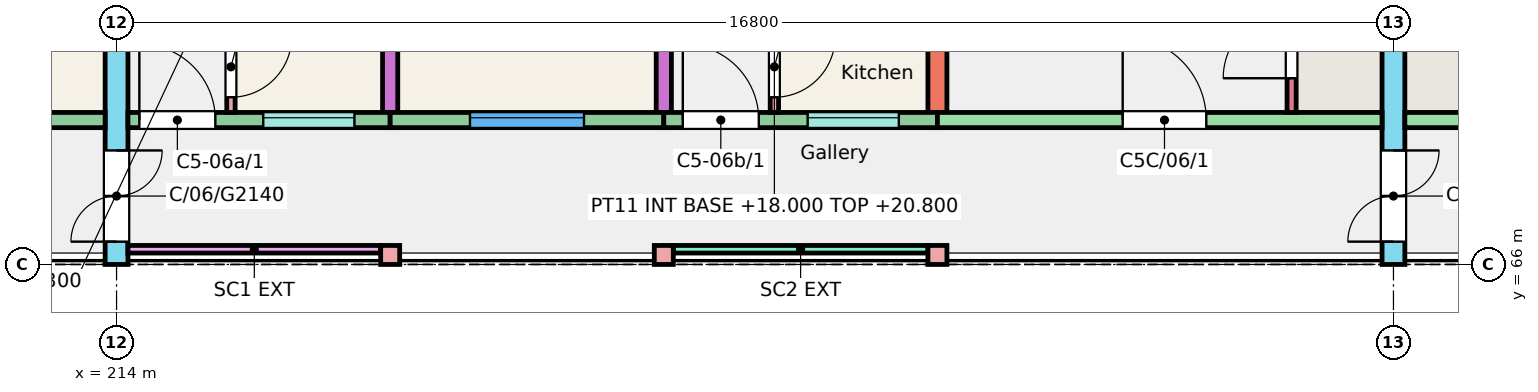
"""IFC4 building model, lengths in metres.
Left out: names, types, materials, properties, quantities, classifications, styles, units other than length and angle.
Written with IfcOpenShell. Run it as: python <this file> out.ifc"""

import sys

from ifc_helpers import new_model, si_unit, direction, frame, frame_2d, origin, origin_2d, place, context, subcontext, project, spatial, rectangle, extrude, element, fill, save


model = new_model("IFC4")
c1 = context("Model", 3, precision=1e-05, world=origin(), true_north=direction((0.0, 1.0)))
c2 = subcontext(c1, "Body", "Model", "MODEL_VIEW")
j1 = project(units=[si_unit("LENGTHUNIT", "METRE"), si_unit("PLANEANGLEUNIT", "RADIAN")], contexts=[c1])
p1 = place(None, origin())
s1 = spatial("IfcSite", under=j1, at=p1, CompositionType="ELEMENT")
p2 = place(p1, origin())
s2 = spatial("IfcBuilding", under=s1, at=p2, CompositionType="ELEMENT")
p3 = place(p2, frame((0.0, 0.0, 18.0)))
s3 = spatial("IfcBuildingStorey", under=s2, at=p3, CompositionType="ELEMENT", Elevation=18.0)
p4 = place(p3, frame((214.0, 66.0, 0.0), z_axis=(0.0, 0.0, 1.0), x_axis=(0.0, 1.0, 0.0)))
e1 = element("IfcWall", 1, at=p4, inside=s3, PredefinedType="SHEAR", context=c2, shape_type="SweptSolid", body=[
    extrude(rectangle(XDim=11.0, YDim=0.3, at=frame_2d((5.5, 0.0))), origin(), (0.0, 0.0, 1.0), 3.0),
])
p5 = place(p4, frame((0.3, 0.0, 0.0)))
e2 = element("IfcOpeningElement", 2, at=p5, cuts=e1, PredefinedType="OPENING", context=c2, shape_type="SweptSolid", body=[
    extrude(rectangle(XDim=1.2, YDim=2.1, at=frame_2d((0.6, 1.05))), frame((0.0, 0.16, 0.0), z_axis=(0.0, -1.0, 0.0), x_axis=(1.0, 0.0, 0.0)), (0.0, 0.0, 1.0), 0.32),
])
p6 = place(p3, frame((217.6, 68.0, 0.0), z_axis=(0.0, 0.0, 1.0), x_axis=(0.0, 1.0, 0.0)))
e3 = element("IfcWall", 3, at=p6, inside=s3, PredefinedType="SHEAR", context=c2, shape_type="SweptSolid", body=[
    extrude(rectangle(XDim=9.0, YDim=0.2, at=frame_2d((4.5, 0.0))), origin(), (0.0, 0.0, 1.0), 3.0),
])
p7 = place(p3, frame((221.2, 68.0, 0.0), z_axis=(0.0, 0.0, 1.0), x_axis=(0.0, 1.0, 0.0)))
e4 = element("IfcWall", 4, at=p7, inside=s3, PredefinedType="SHEAR", context=c2, shape_type="SweptSolid", body=[
    extrude(rectangle(XDim=9.0, YDim=0.2, at=frame_2d((4.5, 0.0))), origin(), (0.0, 0.0, 1.0), 3.0),
])
p8 = place(p7, frame((2.4, 0.0, 0.0)))
e5 = element("IfcOpeningElement", 5, at=p8, cuts=e4, PredefinedType="OPENING", context=c2, shape_type="SweptSolid", body=[
    extrude(rectangle(XDim=1.2, YDim=2.1, at=frame_2d((0.6, 1.05))), frame((0.0, 0.11, 0.0), z_axis=(0.0, -1.0, 0.0), x_axis=(1.0, 0.0, 0.0)), (0.0, 0.0, 1.0), 0.22),
])
p9 = place(p7, frame((6.4, 0.0, 0.0)))
e6 = element("IfcOpeningElement", 6, at=p9, cuts=e4, PredefinedType="OPENING", context=c2, shape_type="SweptSolid", body=[
    extrude(rectangle(XDim=1.2, YDim=2.1, at=frame_2d((0.6, 1.05))), frame((0.0, 0.11, 0.0), z_axis=(0.0, -1.0, 0.0), x_axis=(1.0, 0.0, 0.0)), (0.0, 0.0, 1.0), 0.22),
])
p10 = place(p3, frame((224.8, 68.0, 0.0), z_axis=(0.0, 0.0, 1.0), x_axis=(0.0, 1.0, 0.0)))
e7 = element("IfcWall", 7, at=p10, inside=s3, PredefinedType="SHEAR", context=c2, shape_type="SweptSolid", body=[
    extrude(rectangle(XDim=9.0, YDim=0.25, at=frame_2d((4.5, 0.0))), origin(), (0.0, 0.0, 1.0), 3.0),
])
p11 = place(p3, frame((230.8, 66.0, 0.0), z_axis=(0.0, 0.0, 1.0), x_axis=(0.0, 1.0, 0.0)))
e8 = element("IfcWall", 8, at=p11, inside=s3, PredefinedType="SHEAR", context=c2, shape_type="SweptSolid", body=[
    extrude(rectangle(XDim=11.0, YDim=0.3, at=frame_2d((5.5, 0.0))), origin(), (0.0, 0.0, 1.0), 3.0),
])
p12 = place(p11, frame((0.3, 0.0, 0.0)))
e9 = element("IfcOpeningElement", 9, at=p12, cuts=e8, PredefinedType="OPENING", context=c2, shape_type="SweptSolid", body=[
    extrude(rectangle(XDim=1.2, YDim=2.1, at=frame_2d((0.6, 1.05))), frame((0.0, 0.16, 0.0), z_axis=(0.0, -1.0, 0.0), x_axis=(1.0, 0.0, 0.0)), (0.0, 0.0, 1.0), 0.32),
])
p13 = place(p3, frame((210.4, 67.9, 0.0), z_axis=(0.0, 0.0, 1.0), x_axis=(1.0, 0.0, 0.0)))
e10 = element("IfcWall", 10, at=p13, inside=s3, PredefinedType="SOLIDWALL", context=c2, shape_type="SweptSolid", body=[
    extrude(rectangle(XDim=3.45, YDim=0.2, at=frame_2d((1.725, 0.0))), origin(), (0.0, 0.0, 1.0), 3.0),
])
p14 = place(p13, frame((1.025, 0.0, 0.9)))
e11 = element("IfcOpeningElement", 11, at=p14, cuts=e10, PredefinedType="OPENING", context=c2, shape_type="SweptSolid", body=[
    extrude(rectangle(XDim=1.5, YDim=1.5, at=frame_2d((0.75, 0.75))), frame((0.0, 0.11, 0.0), z_axis=(0.0, -1.0, 0.0), x_axis=(1.0, 0.0, 0.0)), (0.0, 0.0, 1.0), 0.22),
])
p15 = place(p3, frame((214.15, 67.9, 0.0), z_axis=(0.0, 0.0, 1.0), x_axis=(1.0, 0.0, 0.0)))
e12 = element("IfcWall", 12, at=p15, inside=s3, PredefinedType="SOLIDWALL", context=c2, shape_type="SweptSolid", body=[
    extrude(rectangle(XDim=3.45, YDim=0.2, at=frame_2d((1.725, 0.0))), origin(), (0.0, 0.0, 1.0), 3.0),
])
p16 = place(p15, frame((1.78, 0.0, 1.1)))
e13 = element("IfcOpeningElement", 13, at=p16, cuts=e12, PredefinedType="OPENING", context=c2, shape_type="SweptSolid", body=[
    extrude(rectangle(XDim=1.2, YDim=1.3, at=frame_2d((0.6, 0.65))), frame((0.0, 0.11, 0.0), z_axis=(0.0, -1.0, 0.0), x_axis=(1.0, 0.0, 0.0)), (0.0, 0.0, 1.0), 0.22),
])
p17 = place(p15, frame((0.15, 0.0, 0.0)))
e14 = element("IfcOpeningElement", 14, at=p17, cuts=e12, PredefinedType="OPENING", context=c2, shape_type="SweptSolid", body=[
    extrude(rectangle(XDim=1.0, YDim=2.1, at=frame_2d((0.5, 1.05))), frame((0.0, 0.11, 0.0), z_axis=(0.0, -1.0, 0.0), x_axis=(1.0, 0.0, 0.0)), (0.0, 0.0, 1.0), 0.22),
])
p18 = place(p3, frame((217.6, 67.9, 0.0), z_axis=(0.0, 0.0, 1.0), x_axis=(1.0, 0.0, 0.0)))
e15 = element("IfcWall", 15, at=p18, inside=s3, PredefinedType="SOLIDWALL", context=c2, shape_type="SweptSolid", body=[
    extrude(rectangle(XDim=3.6, YDim=0.2, at=frame_2d((1.8, 0.0))), origin(), (0.0, 0.0, 1.0), 3.0),
])
p19 = place(p18, frame((1.05, 0.0, 0.9)))
e16 = element("IfcOpeningElement", 16, at=p19, cuts=e15, PredefinedType="OPENING", context=c2, shape_type="SweptSolid", body=[
    extrude(rectangle(XDim=1.5, YDim=1.5, at=frame_2d((0.75, 0.75))), frame((0.0, 0.11, 0.0), z_axis=(0.0, -1.0, 0.0), x_axis=(1.0, 0.0, 0.0)), (0.0, 0.0, 1.0), 0.22),
])
p20 = place(p3, frame((221.2, 67.9, 0.0), z_axis=(0.0, 0.0, 1.0), x_axis=(1.0, 0.0, 0.0)))
e17 = element("IfcWall", 17, at=p20, inside=s3, PredefinedType="SOLIDWALL", context=c2, shape_type="SweptSolid", body=[
    extrude(rectangle(XDim=3.6, YDim=0.2, at=frame_2d((1.8, 0.0))), origin(), (0.0, 0.0, 1.0), 3.0),
])
p21 = place(p20, frame((1.893, 0.0, 1.1)))
e18 = element("IfcOpeningElement", 18, at=p21, cuts=e17, PredefinedType="OPENING", context=c2, shape_type="SweptSolid", body=[
    extrude(rectangle(XDim=1.2, YDim=1.3, at=frame_2d((0.6, 0.65))), frame((0.0, 0.11, 0.0), z_axis=(0.0, -1.0, 0.0), x_axis=(1.0, 0.0, 0.0)), (0.0, 0.0, 1.0), 0.22),
])
p22 = place(p20, frame((0.25, 0.0, 0.0)))
e19 = element("IfcOpeningElement", 19, at=p22, cuts=e17, PredefinedType="OPENING", context=c2, shape_type="SweptSolid", body=[
    extrude(rectangle(XDim=1.0, YDim=2.1, at=frame_2d((0.5, 1.05))), frame((0.0, 0.11, 0.0), z_axis=(0.0, -1.0, 0.0), x_axis=(1.0, 0.0, 0.0)), (0.0, 0.0, 1.0), 0.22),
])
p23 = place(p3, frame((224.8, 67.9, 0.0), z_axis=(0.0, 0.0, 1.0), x_axis=(1.0, 0.0, 0.0)))
e20 = element("IfcWall", 20, at=p23, inside=s3, PredefinedType="SHEAR", context=c2, shape_type="SweptSolid", body=[
    extrude(rectangle(XDim=5.85, YDim=0.2, at=frame_2d((2.925, 0.0))), origin(), (0.0, 0.0, 1.0), 3.0),
])
p24 = place(p23, frame((2.438, 0.0, 0.0)))
e21 = element("IfcOpeningElement", 21, at=p24, cuts=e20, PredefinedType="OPENING", context=c2, shape_type="SweptSolid", body=[
    extrude(rectangle(XDim=1.1, YDim=2.1, at=frame_2d((0.55, 1.05))), frame((0.0, 0.11, 0.0), z_axis=(0.0, -1.0, 0.0), x_axis=(1.0, 0.0, 0.0)), (0.0, 0.0, 1.0), 0.22),
])
p25 = place(p3, frame((229.46, 68.0, 0.0), z_axis=(0.0, 0.0, 1.0), x_axis=(0.0, 1.0, 0.0)))
e22 = element("IfcWall", 22, at=p25, inside=s3, PredefinedType="SHEAR", context=c2, shape_type="SweptSolid", body=[
    extrude(rectangle(XDim=1.72, YDim=0.12, at=frame_2d((0.86, 0.0))), origin(), (0.0, 0.0, 1.0), 3.0),
])
p26 = place(p25, frame((0.45, 0.0, 0.0)))
e23 = element("IfcOpeningElement", 23, at=p26, cuts=e22, PredefinedType="OPENING", context=c2, shape_type="SweptSolid", body=[
    extrude(rectangle(XDim=0.9, YDim=2.1, at=frame_2d((0.45, 1.05))), frame((0.0, 0.07, 0.0), z_axis=(0.0, -1.0, 0.0), x_axis=(1.0, 0.0, 0.0)), (0.0, 0.0, 1.0), 0.14),
])
p27 = place(p3, frame((230.95, 67.9, 0.0), z_axis=(0.0, 0.0, 1.0), x_axis=(1.0, 0.0, 0.0)))
e24 = element("IfcWall", 24, at=p27, inside=s3, PredefinedType="SHEAR", context=c2, shape_type="SweptSolid", body=[
    extrude(rectangle(XDim=5.85, YDim=0.2, at=frame_2d((2.925, 0.0))), origin(), (0.0, 0.0, 1.0), 3.0),
])
p28 = place(p27, frame((2.312, 0.0, 0.0)))
e25 = element("IfcOpeningElement", 25, at=p28, cuts=e24, PredefinedType="OPENING", context=c2, shape_type="SweptSolid", body=[
    extrude(rectangle(XDim=1.1, YDim=2.1, at=frame_2d((0.55, 1.05))), frame((0.0, 0.11, 0.0), z_axis=(0.0, -1.0, 0.0), x_axis=(1.0, 0.0, 0.0)), (0.0, 0.0, 1.0), 0.22),
])
for number, where, z_axis, x_axis in (
    (26, (217.6, 66.125, 0.0), (0.0, 0.0, 1.0), (1.0, 0.0, 0.0)),
    (27, (221.2, 66.125, 0.0), (0.0, 0.0, 1.0), (1.0, 0.0, 0.0)),
    (28, (224.8, 66.125, 0.0), (0.0, 0.0, 1.0), (1.0, 0.0, 0.0)),
):
    element("IfcColumn", number, at=place(p3, frame(where, z_axis=z_axis, x_axis=x_axis)), inside=s3, PredefinedType="COLUMN", context=c2, shape_type="SweptSolid", body=[
        extrude(rectangle(XDim=0.25, YDim=0.25, at=origin_2d()), origin(), (0.0, 0.0, 1.0), 3.0),
    ])
p29 = place(p3, frame((214.15, 66.2, 0.0), z_axis=(0.0, 0.0, 1.0), x_axis=(1.0, 0.0, 0.0)))
e29 = element("IfcWall", 29, at=p29, inside=s3, PredefinedType="SOLIDWALL", context=c2, shape_type="SweptSolid", body=[
    extrude(rectangle(XDim=3.325, YDim=0.1, at=frame_2d((1.663, 0.0))), origin(), (0.0, 0.0, 1.0), 2.45),
])
p30 = place(p3, frame((221.325, 66.2, 0.0), z_axis=(0.0, 0.0, 1.0), x_axis=(1.0, 0.0, 0.0)))
e30 = element("IfcWall", 30, at=p30, inside=s3, PredefinedType="SOLIDWALL", context=c2, shape_type="SweptSolid", body=[
    extrude(rectangle(XDim=3.35, YDim=0.1, at=frame_2d((1.675, 0.0))), origin(), (0.0, 0.0, 1.0), 2.45),
])
p31 = place(p3, frame((215.505, 68.0, 0.0), z_axis=(0.0, 0.0, 1.0), x_axis=(0.0, 1.0, 0.0)))
e31 = element("IfcWall", 31, at=p31, inside=s3, PredefinedType="PARTITIONING", context=c2, shape_type="SweptSolid", body=[
    extrude(rectangle(XDim=4.3, YDim=0.11, at=frame_2d((2.15, 0.0))), origin(), (0.0, 0.0, 1.0), 2.8),
])
p32 = place(p31, frame((0.2, 0.0, 0.0)))
e32 = element("IfcOpeningElement", 32, at=p32, cuts=e31, PredefinedType="OPENING", context=c2, shape_type="SweptSolid", body=[
    extrude(rectangle(XDim=0.8, YDim=2.1, at=frame_2d((0.4, 1.05))), frame((0.0, 0.065, 0.0), z_axis=(0.0, -1.0, 0.0), x_axis=(1.0, 0.0, 0.0)), (0.0, 0.0, 1.0), 0.13),
])
p33 = place(p31, frame((3.35, 0.0, 0.0)))
e33 = element("IfcOpeningElement", 33, at=p33, cuts=e31, PredefinedType="OPENING", context=c2, shape_type="SweptSolid", body=[
    extrude(rectangle(XDim=0.8, YDim=2.1, at=frame_2d((0.4, 1.05))), frame((0.0, 0.065, 0.0), z_axis=(0.0, -1.0, 0.0), x_axis=(1.0, 0.0, 0.0)), (0.0, 0.0, 1.0), 0.13),
])
p34 = place(p3, frame((222.655, 68.0, 0.0), z_axis=(0.0, 0.0, 1.0), x_axis=(0.0, 1.0, 0.0)))
e34 = element("IfcWall", 34, at=p34, inside=s3, PredefinedType="PARTITIONING", context=c2, shape_type="SweptSolid", body=[
    extrude(rectangle(XDim=4.3, YDim=0.11, at=frame_2d((2.15, 0.0))), origin(), (0.0, 0.0, 1.0), 2.8),
])
p35 = place(p34, frame((0.2, 0.0, 0.0)))
e35 = element("IfcOpeningElement", 35, at=p35, cuts=e34, PredefinedType="OPENING", context=c2, shape_type="SweptSolid", body=[
    extrude(rectangle(XDim=0.8, YDim=2.1, at=frame_2d((0.4, 1.05))), frame((0.0, 0.065, 0.0), z_axis=(0.0, -1.0, 0.0), x_axis=(1.0, 0.0, 0.0)), (0.0, 0.0, 1.0), 0.13),
])
p36 = place(p34, frame((3.35, 0.0, 0.0)))
e36 = element("IfcOpeningElement", 36, at=p36, cuts=e34, PredefinedType="OPENING", context=c2, shape_type="SweptSolid", body=[
    extrude(rectangle(XDim=0.8, YDim=2.1, at=frame_2d((0.4, 1.05))), frame((0.0, 0.065, 0.0), z_axis=(0.0, -1.0, 0.0), x_axis=(1.0, 0.0, 0.0)), (0.0, 0.0, 1.0), 0.13),
])
p37 = place(p16, origin())
e37 = element("IfcWindow", 37, at=p37, inside=s3, PartitioningType="SINGLE_PANEL", PredefinedType="WINDOW", context=c2, shape_type="SweptSolid", body=[
    extrude(rectangle(XDim=1.2, YDim=1.3, at=frame_2d((0.6, 0.65))), frame((0.0, 0.06, 0.0), z_axis=(0.0, -1.0, 0.0), x_axis=(1.0, 0.0, 0.0)), (0.0, 0.0, 1.0), 0.06),
])
fill(e13, e37)
p38 = place(p19, origin())
e38 = element("IfcWindow", 38, at=p38, inside=s3, PartitioningType="SINGLE_PANEL", PredefinedType="WINDOW", context=c2, shape_type="SweptSolid", body=[
    extrude(rectangle(XDim=1.5, YDim=1.5, at=frame_2d((0.75, 0.75))), frame((0.0, 0.06, 0.0), z_axis=(0.0, -1.0, 0.0), x_axis=(1.0, 0.0, 0.0)), (0.0, 0.0, 1.0), 0.06),
])
fill(e16, e38)
p39 = place(p21, origin())
e39 = element("IfcWindow", 39, at=p39, inside=s3, PartitioningType="SINGLE_PANEL", PredefinedType="WINDOW", context=c2, shape_type="SweptSolid", body=[
    extrude(rectangle(XDim=1.2, YDim=1.3, at=frame_2d((0.6, 0.65))), frame((0.0, 0.06, 0.0), z_axis=(0.0, -1.0, 0.0), x_axis=(1.0, 0.0, 0.0)), (0.0, 0.0, 1.0), 0.06),
])
fill(e18, e39)
p40 = place(p17, origin())
e40 = element("IfcDoor", 40, at=p40, inside=s3, OperationType="SINGLE_SWING_LEFT", PredefinedType="DOOR", context=c2, shape_type="SweptSolid", body=[
    extrude(rectangle(XDim=1.0, YDim=2.1, at=frame_2d((0.5, 1.05))), frame((0.0, 0.025, 0.0), z_axis=(0.0, -1.0, 0.0), x_axis=(1.0, 0.0, 0.0)), (0.0, 0.0, 1.0), 0.05),
])
fill(e14, e40)
p41 = place(p32, origin())
e41 = element("IfcDoor", 41, at=p41, inside=s3, OperationType="SINGLE_SWING_RIGHT", PredefinedType="DOOR", context=c2, shape_type="SweptSolid", body=[
    extrude(rectangle(XDim=0.8, YDim=2.1, at=frame_2d((0.4, 1.05))), frame((0.0, 0.025, 0.0), z_axis=(0.0, -1.0, 0.0), x_axis=(1.0, 0.0, 0.0)), (0.0, 0.0, 1.0), 0.05),
])
fill(e32, e41)
p42 = place(p22, origin())
e42 = element("IfcDoor", 42, at=p42, inside=s3, OperationType="SINGLE_SWING_LEFT", PredefinedType="DOOR", context=c2, shape_type="SweptSolid", body=[
    extrude(rectangle(XDim=1.0, YDim=2.1, at=frame_2d((0.5, 1.05))), frame((0.0, 0.025, 0.0), z_axis=(0.0, -1.0, 0.0), x_axis=(1.0, 0.0, 0.0)), (0.0, 0.0, 1.0), 0.05),
])
fill(e19, e42)
p43 = place(p35, origin())
e43 = element("IfcDoor", 43, at=p43, inside=s3, OperationType="SINGLE_SWING_RIGHT", PredefinedType="DOOR", context=c2, shape_type="SweptSolid", body=[
    extrude(rectangle(XDim=0.8, YDim=2.1, at=frame_2d((0.4, 1.05))), frame((0.0, 0.025, 0.0), z_axis=(0.0, -1.0, 0.0), x_axis=(1.0, 0.0, 0.0)), (0.0, 0.0, 1.0), 0.05),
])
fill(e35, e43)
p44 = place(p24, origin())
e44 = element("IfcDoor", 44, at=p44, inside=s3, OperationType="SINGLE_SWING_LEFT", PredefinedType="DOOR", context=c2, shape_type="SweptSolid", body=[
    extrude(rectangle(XDim=1.1, YDim=2.1, at=frame_2d((0.55, 1.05))), frame((0.0, 0.025, 0.0), z_axis=(0.0, -1.0, 0.0), x_axis=(1.0, 0.0, 0.0)), (0.0, 0.0, 1.0), 0.05),
])
fill(e21, e44)
p45 = place(p26, origin())
e45 = element("IfcDoor", 45, at=p45, inside=s3, OperationType="SINGLE_SWING_LEFT", PredefinedType="DOOR", context=c2, shape_type="SweptSolid", body=[
    extrude(rectangle(XDim=0.9, YDim=2.1, at=frame_2d((0.45, 1.05))), frame((0.0, 0.025, 0.0), z_axis=(0.0, -1.0, 0.0), x_axis=(1.0, 0.0, 0.0)), (0.0, 0.0, 1.0), 0.05),
])
fill(e23, e45)
p46 = place(p5, origin())
e46 = element("IfcDoor", 46, at=p46, inside=s3, OperationType="DOUBLE_DOOR_SINGLE_SWING", PredefinedType="DOOR", context=c2, shape_type="SweptSolid", body=[
    extrude(rectangle(XDim=1.2, YDim=2.1, at=frame_2d((0.6, 1.05))), frame((0.0, 0.025, 0.0), z_axis=(0.0, -1.0, 0.0), x_axis=(1.0, 0.0, 0.0)), (0.0, 0.0, 1.0), 0.05),
])
fill(e2, e46)
p47 = place(p12, origin())
e47 = element("IfcDoor", 47, at=p47, inside=s3, OperationType="DOUBLE_DOOR_SINGLE_SWING", PredefinedType="DOOR", context=c2, shape_type="SweptSolid", body=[
    extrude(rectangle(XDim=1.2, YDim=2.1, at=frame_2d((0.6, 1.05))), frame((0.0, 0.025, 0.0), z_axis=(0.0, -1.0, 0.0), x_axis=(1.0, 0.0, 0.0)), (0.0, 0.0, 1.0), 0.05),
])
fill(e9, e47)
save(model, sys.argv[1])
